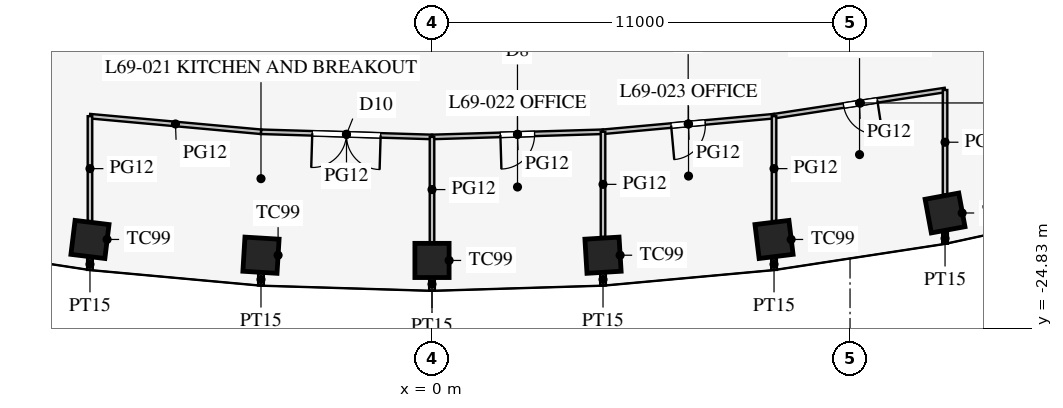
"""IFC4 building model, lengths in metres.
Left out: names, types, materials, properties, quantities, classifications, styles, units other than length and angle.
Written with IfcOpenShell. Run it as: python <this file> out.ifc"""

import sys

from ifc_helpers import new_model, si_unit, direction, frame, frame_2d, origin, origin_2d, place, context, subcontext, project, spatial, rectangle, extrude, element, fill, save


model = new_model("IFC4")
c1 = context("Model", 3, precision=1e-05, world=origin(), true_north=direction((0.0, 1.0)))
c2 = subcontext(c1, "Body", "Model", "MODEL_VIEW")
j1 = project(units=[si_unit("LENGTHUNIT", "METRE"), si_unit("PLANEANGLEUNIT", "RADIAN")], contexts=[c1])
p1 = place(None, origin())
s1 = spatial("IfcSite", under=j1, at=p1, CompositionType="ELEMENT")
p2 = place(p1, origin())
s2 = spatial("IfcBuilding", under=s1, at=p2, CompositionType="ELEMENT")
p3 = place(p2, frame((0.0, 0.0, 301.5)))
s3 = spatial("IfcBuildingStorey", under=s2, at=p3, CompositionType="ELEMENT", Elevation=301.5)
for number, where, z_axis, x_axis in (
    (1, (-9.0, -22.499, 0.0), (0.0, 0.0, 1.0), (0.993, -0.121, 0.0)),
    (2, (-4.5, -22.914, 0.0), (0.0, 0.0, 1.0), (0.998, -0.061, 0.0)),
    (3, (0.0, -23.052, 0.0), (0.0, 0.0, 1.0), (1.0, 0.0, 0.0)),
    (4, (4.5, -22.914, 0.0), (0.0, 0.0, 1.0), (0.998, 0.061, 0.0)),
    (5, (9.0, -22.499, 0.0), (0.0, 0.0, 1.0), (0.993, 0.121, 0.0)),
    (6, (13.5, -21.803, 0.0), (0.0, 0.0, 1.0), (0.983, 0.182, 0.0)),
):
    element("IfcColumn", number, at=place(p3, frame(where, z_axis=z_axis, x_axis=x_axis)), inside=s3, PredefinedType="COLUMN", context=c2, shape_type="SweptSolid", body=[
        extrude(rectangle(XDim=0.9, YDim=0.9, at=origin_2d()), origin(), (0.0, 0.0, 1.0), 4.2),
    ])
p4 = place(p3, frame((13.5, -22.331, 0.0), z_axis=(0.0, 0.0, 1.0), x_axis=(0.0, -1.0, 0.0)))
e7 = element("IfcWall", 7, at=p4, inside=s3, PredefinedType="PARTITIONING", context=c2, shape_type="SweptSolid", body=[
    extrude(rectangle(XDim=0.28, YDim=0.15, at=frame_2d((0.14, 0.0))), origin(), (0.0, 0.0, 1.0), 2.9),
])
p5 = place(p3, frame((4.5, -23.394, 0.0), z_axis=(0.0, 0.0, 1.0), x_axis=(0.0, -1.0, 0.0)))
e8 = element("IfcWall", 8, at=p5, inside=s3, PredefinedType="PARTITIONING", context=c2, shape_type="SweptSolid", body=[
    extrude(rectangle(XDim=0.316, YDim=0.15, at=frame_2d((0.158, 0.0))), origin(), (0.0, 0.0, 1.0), 2.9),
])
p6 = place(p3, frame((9.0, -23.004, 0.0), z_axis=(0.0, 0.0, 1.0), x_axis=(0.0, -1.0, 0.0)))
e9 = element("IfcWall", 9, at=p6, inside=s3, PredefinedType="PARTITIONING", context=c2, shape_type="SweptSolid", body=[
    extrude(rectangle(XDim=0.296, YDim=0.15, at=frame_2d((0.148, 0.0))), origin(), (0.0, 0.0, 1.0), 2.9),
])
p7 = place(p3, frame((0.0, -23.506, 0.0), z_axis=(0.0, 0.0, 1.0), x_axis=(0.0, -1.0, 0.0)))
e10 = element("IfcWall", 10, at=p7, inside=s3, PredefinedType="PARTITIONING", context=c2, shape_type="SweptSolid", body=[
    extrude(rectangle(XDim=0.341, YDim=0.15, at=frame_2d((0.17, 0.0))), origin(), (0.0, 0.0, 1.0), 2.9),
])
p8 = place(p3, frame((-4.5, -23.394, 0.0), z_axis=(0.0, 0.0, 1.0), x_axis=(0.0, -1.0, 0.0)))
e11 = element("IfcWall", 11, at=p8, inside=s3, PredefinedType="PARTITIONING", context=c2, shape_type="SweptSolid", body=[
    extrude(rectangle(XDim=0.316, YDim=0.15, at=frame_2d((0.158, 0.0))), origin(), (0.0, 0.0, 1.0), 2.9),
])
p9 = place(p3, frame((-9.0, -23.004, 0.0), z_axis=(0.0, 0.0, 1.0), x_axis=(0.0, -1.0, 0.0)))
e12 = element("IfcWall", 12, at=p9, inside=s3, PredefinedType="PARTITIONING", context=c2, shape_type="SweptSolid", body=[
    extrude(rectangle(XDim=0.296, YDim=0.15, at=frame_2d((0.148, 0.0))), origin(), (0.0, 0.0, 1.0), 2.9),
])
p10 = place(p3, frame((0.0, -19.802, 0.0), z_axis=(0.0, 0.0, 1.0), x_axis=(0.999542074227, 0.030259574513, 0.0)))
e13 = element("IfcWall", 13, at=p10, inside=s3, PredefinedType="PARTITIONING", context=c2, shape_type="SweptSolid", body=[
    extrude(rectangle(XDim=4.502, YDim=0.12, at=frame_2d((2.251, 0.0))), origin(), (0.0, 0.0, 1.0), 2.9),
])
p11 = place(p10, frame((1.8, 0.0, 0.15)))
e14 = element("IfcOpeningElement", 14, at=p11, cuts=e13, PredefinedType="OPENING", context=c2, shape_type="SweptSolid", body=[
    extrude(rectangle(XDim=0.9, YDim=2.1, at=frame_2d((0.45, 1.05))), frame((0.0, 0.07, 0.0), z_axis=(0.0, -1.0, 0.0), x_axis=(1.0, 0.0, 0.0)), (0.0, 0.0, 1.0), 0.14),
])
p12 = place(p3, frame((4.5, -19.665, 0.0), z_axis=(0.0, 0.0, 1.0), x_axis=(0.995871921504, 0.090769576179, 0.0)))
e15 = element("IfcWall", 15, at=p12, inside=s3, PredefinedType="PARTITIONING", context=c2, shape_type="SweptSolid", body=[
    extrude(rectangle(XDim=4.519, YDim=0.12, at=frame_2d((2.259, 0.0))), origin(), (0.0, 0.0, 1.0), 2.9),
])
p13 = place(p12, frame((1.8, 0.0, 0.15)))
e16 = element("IfcOpeningElement", 16, at=p13, cuts=e15, PredefinedType="OPENING", context=c2, shape_type="SweptSolid", body=[
    extrude(rectangle(XDim=0.9, YDim=2.1, at=frame_2d((0.45, 1.05))), frame((0.0, 0.07, 0.0), z_axis=(0.0, -1.0, 0.0), x_axis=(1.0, 0.0, 0.0)), (0.0, 0.0, 1.0), 0.14),
])
p14 = place(p3, frame((9.0, -19.255, 0.0), z_axis=(0.0, 0.0, 1.0), x_axis=(0.988481794406, 0.151339823341, 0.0)))
e17 = element("IfcWall", 17, at=p14, inside=s3, PredefinedType="PARTITIONING", context=c2, shape_type="SweptSolid", body=[
    extrude(rectangle(XDim=4.552, YDim=0.12, at=frame_2d((2.276, 0.0))), origin(), (0.0, 0.0, 1.0), 2.9),
])
p15 = place(p14, frame((1.85, 0.0, 0.15)))
e18 = element("IfcOpeningElement", 18, at=p15, cuts=e17, PredefinedType="OPENING", context=c2, shape_type="SweptSolid", body=[
    extrude(rectangle(XDim=0.9, YDim=2.1, at=frame_2d((0.45, 1.05))), frame((0.0, 0.07, 0.0), z_axis=(0.0, -1.0, 0.0), x_axis=(1.0, 0.0, 0.0)), (0.0, 0.0, 1.0), 0.14),
])
p16 = place(p3, frame((-4.5, -19.665, 0.0), z_axis=(0.0, 0.0, 1.0), x_axis=(0.999542074227, -0.030259574513, 0.0)))
e19 = element("IfcWall", 19, at=p16, inside=s3, PredefinedType="PARTITIONING", context=c2, shape_type="SweptSolid", body=[
    extrude(rectangle(XDim=4.502, YDim=0.12, at=frame_2d((2.251, 0.0))), origin(), (0.0, 0.0, 1.0), 2.9),
])
p17 = place(p16, frame((1.35, 0.0, 0.15)))
e20 = element("IfcOpeningElement", 20, at=p17, cuts=e19, PredefinedType="OPENING", context=c2, shape_type="SweptSolid", body=[
    extrude(rectangle(XDim=1.8, YDim=2.1, at=frame_2d((0.9, 1.05))), frame((0.0, 0.07, 0.0), z_axis=(0.0, -1.0, 0.0), x_axis=(1.0, 0.0, 0.0)), (0.0, 0.0, 1.0), 0.14),
])
p18 = place(p3, frame((-9.0, -19.255, 0.0), z_axis=(0.0, 0.0, 1.0), x_axis=(0.995871921504, -0.090769576179, 0.0)))
e21 = element("IfcWall", 21, at=p18, inside=s3, PredefinedType="PARTITIONING", context=c2, shape_type="SweptSolid", body=[
    extrude(rectangle(XDim=4.519, YDim=0.12, at=frame_2d((2.259, 0.0))), origin(), (0.0, 0.0, 1.0), 2.9),
])
p19 = place(p3, frame((0.0, -19.802, 0.0), z_axis=(0.0, 0.0, 1.0), x_axis=(0.0, -1.0, 0.0)))
e22 = element("IfcWall", 22, at=p19, inside=s3, PredefinedType="PARTITIONING", context=c2, shape_type="SweptSolid", body=[
    extrude(rectangle(XDim=2.77, YDim=0.12, at=frame_2d((1.385, 0.0))), origin(), (0.0, 0.0, 1.0), 2.9),
])
p20 = place(p3, frame((13.5, -18.566, 0.0), z_axis=(0.0, 0.0, 1.0), x_axis=(0.0, -1.0, 0.0)))
e23 = element("IfcWall", 23, at=p20, inside=s3, PredefinedType="PARTITIONING", context=c2, shape_type="SweptSolid", body=[
    extrude(rectangle(XDim=2.749, YDim=0.12, at=frame_2d((1.374, 0.0))), origin(), (0.0, 0.0, 1.0), 2.9),
])
p21 = place(p3, frame((4.5, -19.665, 0.0), z_axis=(0.0, 0.0, 1.0), x_axis=(0.0, -1.0, 0.0)))
e24 = element("IfcWall", 24, at=p21, inside=s3, PredefinedType="PARTITIONING", context=c2, shape_type="SweptSolid", body=[
    extrude(rectangle(XDim=2.768, YDim=0.12, at=frame_2d((1.384, 0.0))), origin(), (0.0, 0.0, 1.0), 2.9),
])
for number, where, z_axis, x_axis in (
    (25, (9.0, -19.255, 0.0), (0.0, 0.0, 1.0), (0.0, -1.0, 0.0)),
    (26, (-9.0, -19.255, 0.0), (0.0, 0.0, 1.0), (0.0, -1.0, 0.0)),
):
    element("IfcWall", number, at=place(p3, frame(where, z_axis=z_axis, x_axis=x_axis)), inside=s3, PredefinedType="PARTITIONING", context=c2, shape_type="SweptSolid", body=[
        extrude(rectangle(XDim=2.76, YDim=0.12, at=frame_2d((1.38, 0.0))), origin(), (0.0, 0.0, 1.0), 2.9),
    ])
p22 = place(p17, frame((1.8, 0.0, 0.0), z_axis=(0.0, 0.0, 1.0), x_axis=(-1.0, 0.0, 0.0)))
e27 = element("IfcDoor", 27, at=p22, inside=s3, OperationType="DOUBLE_DOOR_SINGLE_SWING", PredefinedType="DOOR", context=c2, shape_type="SweptSolid", body=[
    extrude(rectangle(XDim=1.8, YDim=2.1, at=frame_2d((0.9, 1.05))), frame((0.0, 0.025, 0.0), z_axis=(0.0, -1.0, 0.0), x_axis=(1.0, 0.0, 0.0)), (0.0, 0.0, 1.0), 0.05),
])
fill(e20, e27)
p23 = place(p11, frame((0.9, 0.0, 0.0), z_axis=(0.0, 0.0, 1.0), x_axis=(-1.0, 0.0, 0.0)))
e28 = element("IfcDoor", 28, at=p23, inside=s3, OperationType="SINGLE_SWING_RIGHT", PredefinedType="DOOR", context=c2, shape_type="SweptSolid", body=[
    extrude(rectangle(XDim=0.9, YDim=2.1, at=frame_2d((0.45, 1.05))), frame((0.0, 0.025, 0.0), z_axis=(0.0, -1.0, 0.0), x_axis=(1.0, 0.0, 0.0)), (0.0, 0.0, 1.0), 0.05),
])
fill(e14, e28)
p24 = place(p13, frame((0.9, 0.0, 0.0), z_axis=(0.0, 0.0, 1.0), x_axis=(-1.0, 0.0, 0.0)))
e29 = element("IfcDoor", 29, at=p24, inside=s3, OperationType="SINGLE_SWING_RIGHT", PredefinedType="DOOR", context=c2, shape_type="SweptSolid", body=[
    extrude(rectangle(XDim=0.9, YDim=2.1, at=frame_2d((0.45, 1.05))), frame((0.0, 0.025, 0.0), z_axis=(0.0, -1.0, 0.0), x_axis=(1.0, 0.0, 0.0)), (0.0, 0.0, 1.0), 0.05),
])
fill(e16, e29)
p25 = place(p15, frame((0.9, 0.0, 0.0), z_axis=(0.0, 0.0, 1.0), x_axis=(-1.0, 0.0, 0.0)))
e30 = element("IfcDoor", 30, at=p25, inside=s3, OperationType="SINGLE_SWING_LEFT", PredefinedType="DOOR", context=c2, shape_type="SweptSolid", body=[
    extrude(rectangle(XDim=0.9, YDim=2.1, at=frame_2d((0.45, 1.05))), frame((0.0, 0.025, 0.0), z_axis=(0.0, -1.0, 0.0), x_axis=(1.0, 0.0, 0.0)), (0.0, 0.0, 1.0), 0.05),
])
fill(e18, e30)
save(model, sys.argv[1])
